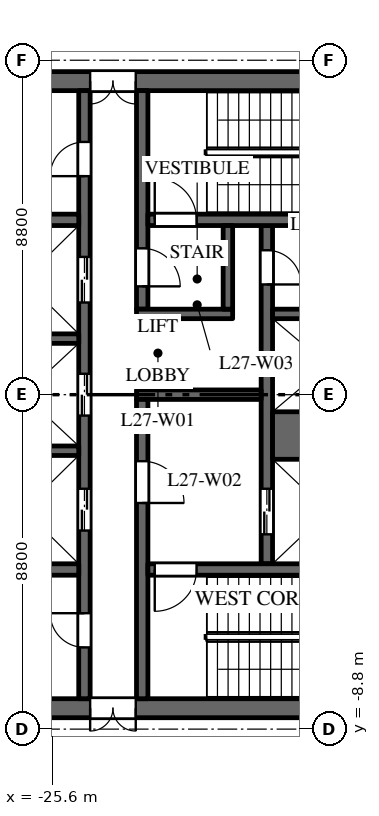
"""IFC4 building model, lengths in metres.
Left out: names, types, materials, properties, quantities, classifications, styles, units other than length and angle.
Written with IfcOpenShell. Run it as: python <this file> out.ifc"""

import sys

from ifc_helpers import new_model, si_unit, direction, frame, frame_2d, origin, place, context, subcontext, project, spatial, rectangle, extrude, element, fill, save


model = new_model("IFC4")
c1 = context("Model", 3, precision=1e-05, world=origin(), true_north=direction((0.0, 1.0)))
c2 = subcontext(c1, "Body", "Model", "MODEL_VIEW")
j1 = project(units=[si_unit("LENGTHUNIT", "METRE"), si_unit("PLANEANGLEUNIT", "RADIAN")], contexts=[c1])
p1 = place(None, origin())
s1 = spatial("IfcSite", under=j1, at=p1, CompositionType="ELEMENT")
p2 = place(p1, origin())
s2 = spatial("IfcBuilding", under=s1, at=p2, CompositionType="ELEMENT")
p3 = place(p2, frame((0.0, 0.0, 120.0)))
s3 = spatial("IfcBuildingStorey", under=s2, at=p3, CompositionType="ELEMENT", Elevation=120.0)
p4 = place(p3, frame((-16.5, 8.25, 0.0), z_axis=(0.0, 0.0, 1.0), x_axis=(-1.0, 0.0, 0.0)))
e1 = element("IfcWall", 1, at=p4, inside=s3, PredefinedType="SHEAR", context=c2, shape_type="SweptSolid", body=[
    extrude(rectangle(XDim=15.0, YDim=0.5, at=frame_2d((7.5, 0.0))), origin(), (0.0, 0.0, 1.0), 3.7),
])
p5 = place(p4, frame((6.9, 0.0, 0.0)))
e2 = element("IfcOpeningElement", 2, at=p5, cuts=e1, PredefinedType="OPENING", context=c2, shape_type="SweptSolid", body=[
    extrude(rectangle(XDim=1.2, YDim=2.1, at=frame_2d((0.6, 1.05))), frame((0.0, 0.26, 0.0), z_axis=(0.0, -1.0, 0.0), x_axis=(1.0, 0.0, 0.0)), (0.0, 0.0, 1.0), 0.52),
])
p6 = place(p4, frame((12.05, 0.0, 0.0)))
e3 = element("IfcOpeningElement", 3, at=p6, cuts=e1, PredefinedType="OPENING", context=c2, shape_type="SweptSolid", body=[
    extrude(rectangle(XDim=0.9, YDim=2.1, at=frame_2d((0.45, 1.05))), frame((0.0, 0.26, 0.0), z_axis=(0.0, -1.0, 0.0), x_axis=(1.0, 0.0, 0.0)), (0.0, 0.0, 1.0), 0.52),
])
p7 = place(p3, frame((-16.5, -8.25, 0.0), z_axis=(0.0, 0.0, 1.0), x_axis=(-1.0, 0.0, 0.0)))
e4 = element("IfcWall", 4, at=p7, inside=s3, PredefinedType="SHEAR", context=c2, shape_type="SweptSolid", body=[
    extrude(rectangle(XDim=15.0, YDim=0.5, at=frame_2d((7.5, 0.0))), origin(), (0.0, 0.0, 1.0), 3.7),
])
p8 = place(p7, frame((6.9, 0.0, 0.0)))
e5 = element("IfcOpeningElement", 5, at=p8, cuts=e4, PredefinedType="OPENING", context=c2, shape_type="SweptSolid", body=[
    extrude(rectangle(XDim=1.2, YDim=2.1, at=frame_2d((0.6, 1.05))), frame((0.0, 0.26, 0.0), z_axis=(0.0, -1.0, 0.0), x_axis=(1.0, 0.0, 0.0)), (0.0, 0.0, 1.0), 0.52),
])
p9 = place(p7, frame((12.05, 0.0, 0.0)))
e6 = element("IfcOpeningElement", 6, at=p9, cuts=e4, PredefinedType="OPENING", context=c2, shape_type="SweptSolid", body=[
    extrude(rectangle(XDim=0.9, YDim=2.1, at=frame_2d((0.45, 1.05))), frame((0.0, 0.26, 0.0), z_axis=(0.0, -1.0, 0.0), x_axis=(1.0, 0.0, 0.0)), (0.0, 0.0, 1.0), 0.52),
])
p10 = place(p3, frame((-19.95, -4.45, 0.0), z_axis=(0.0, 0.0, 1.0), x_axis=(0.0, 1.0, 0.0)))
e7 = element("IfcWall", 7, at=p10, inside=s3, PredefinedType="SHEAR", context=c2, shape_type="SweptSolid", body=[
    extrude(rectangle(XDim=8.9, YDim=0.3, at=frame_2d((4.45, 0.0))), origin(), (0.0, 0.0, 1.0), 3.7),
])
p11 = place(p10, frame((0.775, 0.0, 0.0)))
e8 = element("IfcOpeningElement", 8, at=p11, cuts=e7, PredefinedType="OPENING", context=c2, shape_type="SweptSolid", body=[
    extrude(rectangle(XDim=1.2, YDim=2.1, at=frame_2d((0.6, 1.05))), frame((0.0, 0.16, 0.0), z_axis=(0.0, -1.0, 0.0), x_axis=(1.0, 0.0, 0.0)), (0.0, 0.0, 1.0), 0.32),
])
p12 = place(p10, frame((7.35, 0.0, 0.0)))
e9 = element("IfcOpeningElement", 9, at=p12, cuts=e7, PredefinedType="OPENING", context=c2, shape_type="SweptSolid", body=[
    extrude(rectangle(XDim=0.9, YDim=2.1, at=frame_2d((0.45, 1.05))), frame((0.0, 0.16, 0.0), z_axis=(0.0, -1.0, 0.0), x_axis=(1.0, 0.0, 0.0)), (0.0, 0.0, 1.0), 0.32),
])
p13 = place(p3, frame((-24.75, -8.0, 0.0), z_axis=(0.0, 0.0, 1.0), x_axis=(0.0, 1.0, 0.0)))
e10 = element("IfcWall", 10, at=p13, inside=s3, PredefinedType="SHEAR", context=c2, shape_type="SweptSolid", body=[
    extrude(rectangle(XDim=16.0, YDim=0.3, at=frame_2d((8.0, 0.0))), origin(), (0.0, 0.0, 1.0), 3.7),
])
p14 = place(p13, frame((4.425, 0.0, 0.0)))
e11 = element("IfcOpeningElement", 11, at=p14, cuts=e10, PredefinedType="OPENING", context=c2, shape_type="SweptSolid", body=[
    extrude(rectangle(XDim=1.1, YDim=2.1, at=frame_2d((0.55, 1.05))), frame((0.0, 0.16, 0.0), z_axis=(0.0, -1.0, 0.0), x_axis=(1.0, 0.0, 0.0)), (0.0, 0.0, 1.0), 0.32),
])
p15 = place(p13, frame((7.45, 0.0, 0.0)))
e12 = element("IfcOpeningElement", 12, at=p15, cuts=e10, PredefinedType="OPENING", context=c2, shape_type="SweptSolid", body=[
    extrude(rectangle(XDim=1.1, YDim=2.1, at=frame_2d((0.55, 1.05))), frame((0.0, 0.16, 0.0), z_axis=(0.0, -1.0, 0.0), x_axis=(1.0, 0.0, 0.0)), (0.0, 0.0, 1.0), 0.32),
])
p16 = place(p13, frame((10.425, 0.0, 0.0)))
e13 = element("IfcOpeningElement", 13, at=p16, cuts=e10, PredefinedType="OPENING", context=c2, shape_type="SweptSolid", body=[
    extrude(rectangle(XDim=1.2, YDim=2.1, at=frame_2d((0.6, 1.05))), frame((0.0, 0.16, 0.0), z_axis=(0.0, -1.0, 0.0), x_axis=(1.0, 0.0, 0.0)), (0.0, 0.0, 1.0), 0.32),
])
p17 = place(p13, frame((13.75, 0.0, 0.0)))
e14 = element("IfcOpeningElement", 14, at=p17, cuts=e10, PredefinedType="OPENING", context=c2, shape_type="SweptSolid", body=[
    extrude(rectangle(XDim=0.9, YDim=2.1, at=frame_2d((0.45, 1.05))), frame((0.0, 0.16, 0.0), z_axis=(0.0, -1.0, 0.0), x_axis=(1.0, 0.0, 0.0)), (0.0, 0.0, 1.0), 0.32),
])
p18 = place(p13, frame((1.35, 0.0, 0.0)))
e15 = element("IfcOpeningElement", 15, at=p18, cuts=e10, PredefinedType="OPENING", context=c2, shape_type="SweptSolid", body=[
    extrude(rectangle(XDim=0.9, YDim=2.1, at=frame_2d((0.45, 1.05))), frame((0.0, 0.16, 0.0), z_axis=(0.0, -1.0, 0.0), x_axis=(1.0, 0.0, 0.0)), (0.0, 0.0, 1.0), 0.32),
])
p19 = place(p3, frame((-20.1, 0.0, 0.0), z_axis=(0.0, 0.0, 1.0), x_axis=(-1.0, 0.0, 0.0)))
e16 = element("IfcWall", 16, at=p19, inside=s3, PredefinedType="SHEAR", context=c2, shape_type="SweptSolid", body=[
    extrude(rectangle(XDim=3.28, YDim=0.25, at=frame_2d((1.64, 0.0))), origin(), (0.0, 0.0, 1.0), 3.7),
])
p20 = place(p3, frame((-24.9, 4.6, 0.0), z_axis=(0.0, 0.0, 1.0), x_axis=(-1.0, 0.0, 0.0)))
e17 = element("IfcWall", 17, at=p20, inside=s3, PredefinedType="SHEAR", context=c2, shape_type="SweptSolid", body=[
    extrude(rectangle(XDim=6.1, YDim=0.3, at=frame_2d((3.05, 0.0))), origin(), (0.0, 0.0, 1.0), 3.7),
])
p21 = place(p20, frame((4.2, 0.0, 0.0)))
e18 = element("IfcOpeningElement", 18, at=p21, cuts=e17, PredefinedType="OPENING", context=c2, shape_type="SweptSolid", body=[
    extrude(rectangle(XDim=0.9, YDim=2.1, at=frame_2d((0.45, 1.05))), frame((0.0, 0.16, 0.0), z_axis=(0.0, -1.0, 0.0), x_axis=(1.0, 0.0, 0.0)), (0.0, 0.0, 1.0), 0.32),
])
p22 = place(p3, frame((-24.9, -4.6, 0.0), z_axis=(0.0, 0.0, 1.0), x_axis=(-1.0, 0.0, 0.0)))
e19 = element("IfcWall", 19, at=p22, inside=s3, PredefinedType="SHEAR", context=c2, shape_type="SweptSolid", body=[
    extrude(rectangle(XDim=6.1, YDim=0.3, at=frame_2d((3.05, 0.0))), origin(), (0.0, 0.0, 1.0), 3.7),
])
p23 = place(p3, frame((-16.9, -1.075, 0.0), z_axis=(0.0, 0.0, 1.0), x_axis=(-1.0, 0.0, 0.0)))
e20 = element("IfcWall", 20, at=p23, inside=s3, PredefinedType="SHEAR", context=c2, shape_type="SweptSolid", body=[
    extrude(rectangle(XDim=2.9, YDim=1.25, at=frame_2d((1.45, 0.0))), origin(), (0.0, 0.0, 1.0), 3.7),
])
for number, where, z_axis, x_axis in (
    (21, (-16.9, 2.125, 0.0), (0.0, 0.0, 1.0), (-1.0, 0.0, 0.0)),
    (22, (-24.9, -1.475, 0.0), (0.0, 0.0, 1.0), (-1.0, 0.0, 0.0)),
    (23, (-24.9, 1.475, 0.0), (0.0, 0.0, 1.0), (-1.0, 0.0, 0.0)),
):
    element("IfcWall", number, at=place(p3, frame(where, z_axis=z_axis, x_axis=x_axis)), inside=s3, PredefinedType="SHEAR", context=c2, shape_type="SweptSolid", body=[
        extrude(rectangle(XDim=2.9, YDim=0.25, at=frame_2d((1.45, 0.0))), origin(), (0.0, 0.0, 1.0), 3.7),
    ])
p24 = place(p3, frame((-23.23, 2.25, 0.0), z_axis=(0.0, 0.0, 1.0), x_axis=(0.0, 1.0, 0.0)))
e24 = element("IfcWall", 24, at=p24, inside=s3, PredefinedType="SHEAR", context=c2, shape_type="SweptSolid", body=[
    extrude(rectangle(XDim=5.75, YDim=0.3, at=frame_2d((2.875, 0.0))), origin(), (0.0, 0.0, 1.0), 3.7),
])
p25 = place(p24, frame((0.6, 0.0, 0.0)))
e25 = element("IfcOpeningElement", 25, at=p25, cuts=e24, PredefinedType="OPENING", context=c2, shape_type="SweptSolid", body=[
    extrude(rectangle(XDim=1.0, YDim=2.1, at=frame_2d((0.5, 1.05))), frame((0.0, 0.16, 0.0), z_axis=(0.0, -1.0, 0.0), x_axis=(1.0, 0.0, 0.0)), (0.0, 0.0, 1.0), 0.32),
])
p26 = place(p3, frame((-23.23, -8.0, 0.0), z_axis=(0.0, 0.0, 1.0), x_axis=(0.0, 1.0, 0.0)))
e26 = element("IfcWall", 26, at=p26, inside=s3, PredefinedType="SHEAR", context=c2, shape_type="SweptSolid", body=[
    extrude(rectangle(XDim=7.875, YDim=0.3, at=frame_2d((3.938, 0.0))), origin(), (0.0, 0.0, 1.0), 3.7),
])
p27 = place(p26, frame((5.15, 0.0, 0.0)))
e27 = element("IfcOpeningElement", 27, at=p27, cuts=e26, PredefinedType="OPENING", context=c2, shape_type="SweptSolid", body=[
    extrude(rectangle(XDim=1.1, YDim=2.1, at=frame_2d((0.55, 1.05))), frame((0.0, 0.16, 0.0), z_axis=(0.0, -1.0, 0.0), x_axis=(1.0, 0.0, 0.0)), (0.0, 0.0, 1.0), 0.32),
])
p28 = place(p3, frame((-16.9, 4.6, 0.0), z_axis=(0.0, 0.0, 1.0), x_axis=(-1.0, 0.0, 0.0)))
e28 = element("IfcWall", 28, at=p28, inside=s3, PredefinedType="SHEAR", context=c2, shape_type="SweptSolid", body=[
    extrude(rectangle(XDim=6.18, YDim=0.3, at=frame_2d((3.09, 0.0))), origin(), (0.0, 0.0, 1.0), 3.7),
])
p29 = place(p28, frame((4.9, 0.0, 0.0)))
e29 = element("IfcOpeningElement", 29, at=p29, cuts=e28, PredefinedType="OPENING", context=c2, shape_type="SweptSolid", body=[
    extrude(rectangle(XDim=1.1, YDim=2.1, at=frame_2d((0.55, 1.05))), frame((0.0, 0.16, 0.0), z_axis=(0.0, -1.0, 0.0), x_axis=(1.0, 0.0, 0.0)), (0.0, 0.0, 1.0), 0.32),
])
p30 = place(p3, frame((-16.9, -4.6, 0.0), z_axis=(0.0, 0.0, 1.0), x_axis=(-1.0, 0.0, 0.0)))
e30 = element("IfcWall", 30, at=p30, inside=s3, PredefinedType="SHEAR", context=c2, shape_type="SweptSolid", body=[
    extrude(rectangle(XDim=6.18, YDim=0.3, at=frame_2d((3.09, 0.0))), origin(), (0.0, 0.0, 1.0), 3.7),
])
p31 = place(p30, frame((4.9, 0.0, 0.0)))
e31 = element("IfcOpeningElement", 31, at=p31, cuts=e30, PredefinedType="OPENING", context=c2, shape_type="SweptSolid", body=[
    extrude(rectangle(XDim=1.1, YDim=2.1, at=frame_2d((0.55, 1.05))), frame((0.0, 0.16, 0.0), z_axis=(0.0, -1.0, 0.0), x_axis=(1.0, 0.0, 0.0)), (0.0, 0.0, 1.0), 0.32),
])
p32 = place(p3, frame((-20.85, 2.125, 0.0), z_axis=(0.0, 0.0, 1.0), x_axis=(-1.0, 0.0, 0.0)))
e32 = element("IfcWall", 32, at=p32, inside=s3, PredefinedType="SHEAR", context=c2, shape_type="SweptSolid", body=[
    extrude(rectangle(XDim=2.53, YDim=0.25, at=frame_2d((1.265, 0.0))), origin(), (0.0, 0.0, 1.0), 3.7),
])
p33 = place(p3, frame((-20.975, 2.25, 0.0), z_axis=(0.0, 0.0, 1.0), x_axis=(0.0, 1.0, 0.0)))
e33 = element("IfcWall", 33, at=p33, inside=s3, PredefinedType="SHEAR", context=c2, shape_type="SweptSolid", body=[
    extrude(rectangle(XDim=2.2, YDim=0.25, at=frame_2d((1.1, 0.0))), origin(), (0.0, 0.0, 1.0), 3.7),
])
p34 = place(p11, origin())
e34 = element("IfcDoor", 34, at=p34, inside=s3, OperationType="DOUBLE_DOOR_SLIDING", PredefinedType="DOOR", context=c2, shape_type="SweptSolid", body=[
    extrude(rectangle(XDim=1.2, YDim=2.1, at=frame_2d((0.6, 1.05))), frame((0.0, 0.025, 0.0), z_axis=(0.0, -1.0, 0.0), x_axis=(1.0, 0.0, 0.0)), (0.0, 0.0, 1.0), 0.05),
])
fill(e8, e34)
p35 = place(p14, origin())
e35 = element("IfcDoor", 35, at=p35, inside=s3, OperationType="DOUBLE_DOOR_SLIDING", PredefinedType="DOOR", context=c2, shape_type="SweptSolid", body=[
    extrude(rectangle(XDim=1.1, YDim=2.1, at=frame_2d((0.55, 1.05))), frame((0.0, 0.025, 0.0), z_axis=(0.0, -1.0, 0.0), x_axis=(1.0, 0.0, 0.0)), (0.0, 0.0, 1.0), 0.05),
])
fill(e11, e35)
p36 = place(p15, origin())
e36 = element("IfcDoor", 36, at=p36, inside=s3, OperationType="DOUBLE_DOOR_SLIDING", PredefinedType="DOOR", context=c2, shape_type="SweptSolid", body=[
    extrude(rectangle(XDim=1.1, YDim=2.1, at=frame_2d((0.55, 1.05))), frame((0.0, 0.025, 0.0), z_axis=(0.0, -1.0, 0.0), x_axis=(1.0, 0.0, 0.0)), (0.0, 0.0, 1.0), 0.05),
])
fill(e12, e36)
p37 = place(p16, origin())
e37 = element("IfcDoor", 37, at=p37, inside=s3, OperationType="DOUBLE_DOOR_SLIDING", PredefinedType="DOOR", context=c2, shape_type="SweptSolid", body=[
    extrude(rectangle(XDim=1.2, YDim=2.1, at=frame_2d((0.6, 1.05))), frame((0.0, 0.025, 0.0), z_axis=(0.0, -1.0, 0.0), x_axis=(1.0, 0.0, 0.0)), (0.0, 0.0, 1.0), 0.05),
])
fill(e13, e37)
p38 = place(p29, origin())
e38 = element("IfcDoor", 38, at=p38, inside=s3, OperationType="SINGLE_SWING_RIGHT", PredefinedType="DOOR", context=c2, shape_type="SweptSolid", body=[
    extrude(rectangle(XDim=1.1, YDim=2.1, at=frame_2d((0.55, 1.05))), frame((0.0, 0.025, 0.0), z_axis=(0.0, -1.0, 0.0), x_axis=(1.0, 0.0, 0.0)), (0.0, 0.0, 1.0), 0.05),
])
fill(e29, e38)
p39 = place(p31, origin())
e39 = element("IfcDoor", 39, at=p39, inside=s3, OperationType="SINGLE_SWING_LEFT", PredefinedType="DOOR", context=c2, shape_type="SweptSolid", body=[
    extrude(rectangle(XDim=1.1, YDim=2.1, at=frame_2d((0.55, 1.05))), frame((0.0, 0.025, 0.0), z_axis=(0.0, -1.0, 0.0), x_axis=(1.0, 0.0, 0.0)), (0.0, 0.0, 1.0), 0.05),
])
fill(e31, e39)
p40 = place(p27, origin())
e40 = element("IfcDoor", 40, at=p40, inside=s3, OperationType="SINGLE_SWING_LEFT", PredefinedType="DOOR", context=c2, shape_type="SweptSolid", body=[
    extrude(rectangle(XDim=1.1, YDim=2.1, at=frame_2d((0.55, 1.05))), frame((0.0, 0.025, 0.0), z_axis=(0.0, -1.0, 0.0), x_axis=(1.0, 0.0, 0.0)), (0.0, 0.0, 1.0), 0.05),
])
fill(e27, e40)
p41 = place(p25, origin())
e41 = element("IfcDoor", 41, at=p41, inside=s3, OperationType="SINGLE_SWING_LEFT", PredefinedType="DOOR", context=c2, shape_type="SweptSolid", body=[
    extrude(rectangle(XDim=1.0, YDim=2.1, at=frame_2d((0.5, 1.05))), frame((0.0, 0.025, 0.0), z_axis=(0.0, -1.0, 0.0), x_axis=(1.0, 0.0, 0.0)), (0.0, 0.0, 1.0), 0.05),
])
fill(e25, e41)
p42 = place(p5, origin())
e42 = element("IfcDoor", 42, at=p42, inside=s3, OperationType="DOUBLE_DOOR_DOUBLE_SWING", PredefinedType="DOOR", context=c2, shape_type="SweptSolid", body=[
    extrude(rectangle(XDim=1.2, YDim=2.1, at=frame_2d((0.6, 1.05))), frame((0.0, 0.025, 0.0), z_axis=(0.0, -1.0, 0.0), x_axis=(1.0, 0.0, 0.0)), (0.0, 0.0, 1.0), 0.05),
])
fill(e2, e42)
p43 = place(p8, origin())
e43 = element("IfcDoor", 43, at=p43, inside=s3, OperationType="DOUBLE_DOOR_DOUBLE_SWING", PredefinedType="DOOR", context=c2, shape_type="SweptSolid", body=[
    extrude(rectangle(XDim=1.2, YDim=2.1, at=frame_2d((0.6, 1.05))), frame((0.0, 0.025, 0.0), z_axis=(0.0, -1.0, 0.0), x_axis=(1.0, 0.0, 0.0)), (0.0, 0.0, 1.0), 0.05),
])
fill(e5, e43)
p44 = place(p12, origin())
e44 = element("IfcDoor", 44, at=p44, inside=s3, OperationType="SINGLE_SWING_LEFT", PredefinedType="DOOR", context=c2, shape_type="SweptSolid", body=[
    extrude(rectangle(XDim=0.9, YDim=2.1, at=frame_2d((0.45, 1.05))), frame((0.0, 0.025, 0.0), z_axis=(0.0, -1.0, 0.0), x_axis=(1.0, 0.0, 0.0)), (0.0, 0.0, 1.0), 0.05),
])
fill(e9, e44)
p45 = place(p17, origin())
e45 = element("IfcDoor", 45, at=p45, inside=s3, OperationType="SINGLE_SWING_RIGHT", PredefinedType="DOOR", context=c2, shape_type="SweptSolid", body=[
    extrude(rectangle(XDim=0.9, YDim=2.1, at=frame_2d((0.45, 1.05))), frame((0.0, 0.025, 0.0), z_axis=(0.0, -1.0, 0.0), x_axis=(1.0, 0.0, 0.0)), (0.0, 0.0, 1.0), 0.05),
])
fill(e14, e45)
p46 = place(p18, origin())
e46 = element("IfcDoor", 46, at=p46, inside=s3, OperationType="SINGLE_SWING_LEFT", PredefinedType="DOOR", context=c2, shape_type="SweptSolid", body=[
    extrude(rectangle(XDim=0.9, YDim=2.1, at=frame_2d((0.45, 1.05))), frame((0.0, 0.025, 0.0), z_axis=(0.0, -1.0, 0.0), x_axis=(1.0, 0.0, 0.0)), (0.0, 0.0, 1.0), 0.05),
])
fill(e15, e46)
save(model, sys.argv[1])
